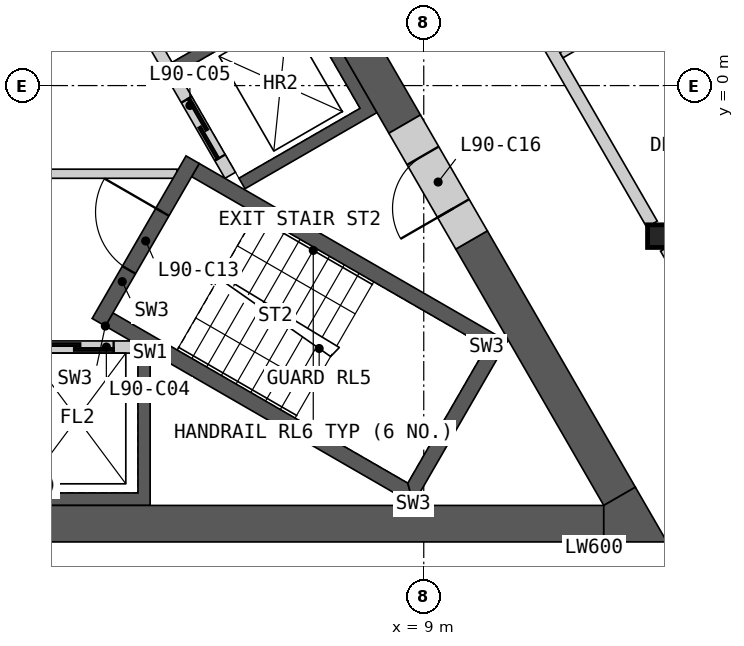
"""IFC4 building model, lengths in metres.
Left out: names, types, materials, properties, quantities, classifications, styles, units other than length and angle.
Written with IfcOpenShell. Run it as: python <this file> out.ifc"""

import sys

from ifc_helpers import new_model, si_unit, direction, frame, frame_2d, origin, origin_2d, place, context, subcontext, project, spatial, polyline, rectangle, i_section, outline, extrude, element, fill, save


model = new_model("IFC4")
c1 = context("Model", 3, precision=1e-05, world=origin(), true_north=direction((0.0, 1.0)))
c2 = subcontext(c1, "Body", "Model", "MODEL_VIEW")
j1 = project(units=[si_unit("LENGTHUNIT", "METRE"), si_unit("PLANEANGLEUNIT", "RADIAN")], contexts=[c1])
p1 = place(None, origin())
s1 = spatial("IfcSite", under=j1, at=p1, CompositionType="ELEMENT")
p2 = place(p1, origin())
s2 = spatial("IfcBuilding", under=s1, at=p2, CompositionType="ELEMENT")
p3 = place(p2, frame((0.0, 0.0, 395.0)))
s3 = spatial("IfcBuildingStorey", under=s2, at=p3, CompositionType="ELEMENT", Elevation=395.0)
p4 = place(p3, frame((12.868, -2.476, 0.0), z_axis=(0.0, 0.0, 1.0), x_axis=(1.0, 0.0, 0.0)))
e1 = element("IfcColumn", 1, at=p4, inside=s3, PredefinedType="COLUMN", context=c2, shape_type="SweptSolid", body=[
    extrude(i_section(OverallWidth=0.374, OverallDepth=0.372, WebThickness=0.016, FlangeThickness=0.026, at=origin_2d()), origin(), (0.0, 0.0, 1.0), 3.4),
])
p5 = place(p3, origin())
e2 = element("IfcWall", 2, at=p5, inside=s3, PredefinedType="SHEAR", context=c2, shape_type="SweptSolid", body=[
    extrude(outline(polyline([(4.5, -4.4), (4.5, -6.906), (-4.5, -6.906), (-4.5, -4.4), (-4.3, -4.4), (-4.3, -6.7), (-2.3, -6.7), (-2.3, -4.4), (-2.1, -4.4), (-2.1, -6.7), (-0.1, -6.7), (-0.1, -4.4), (0.1, -4.4), (0.1, -6.7), (2.1, -6.7), (2.1, -4.4), (2.3, -4.4), (2.3, -6.7), (4.3, -6.7), (4.3, -4.4), (4.5, -4.4)])), origin(), (0.0, 0.0, 1.0), 3.1),
])
p6 = place(p3, frame((-4.187, -4.3, 0.0), z_axis=(0.0, 0.0, 1.0), x_axis=(1.0, 0.0, 0.0)))
e3 = element("IfcWall", 3, at=p6, inside=s3, PredefinedType="SOLIDWALL", context=c2, shape_type="SweptSolid", body=[
    extrude(rectangle(XDim=8.373, YDim=0.2, at=frame_2d((4.187, 0.0))), origin(), (0.0, 0.0, 1.0), 3.1),
])
p7 = place(p6, frame((0.287, 0.0, 0.0)))
e4 = element("IfcOpeningElement", 4, at=p7, cuts=e3, PredefinedType="OPENING", context=c2, shape_type="SweptSolid", body=[
    extrude(rectangle(XDim=1.2, YDim=2.1, at=frame_2d((0.6, 1.05))), frame((0.0, 0.11, 0.0), z_axis=(0.0, -1.0, 0.0), x_axis=(1.0, 0.0, 0.0)), (0.0, 0.0, 1.0), 0.22),
])
p8 = place(p6, frame((2.387, 0.0, 0.0)))
e5 = element("IfcOpeningElement", 5, at=p8, cuts=e3, PredefinedType="OPENING", context=c2, shape_type="SweptSolid", body=[
    extrude(rectangle(XDim=1.4, YDim=2.1, at=frame_2d((0.7, 1.05))), frame((0.0, 0.11, 0.0), z_axis=(0.0, -1.0, 0.0), x_axis=(1.0, 0.0, 0.0)), (0.0, 0.0, 1.0), 0.22),
])
p9 = place(p6, frame((4.737, 0.0, 0.0)))
e6 = element("IfcOpeningElement", 6, at=p9, cuts=e3, PredefinedType="OPENING", context=c2, shape_type="SweptSolid", body=[
    extrude(rectangle(XDim=1.1, YDim=2.1, at=frame_2d((0.55, 1.05))), frame((0.0, 0.11, 0.0), z_axis=(0.0, -1.0, 0.0), x_axis=(1.0, 0.0, 0.0)), (0.0, 0.0, 1.0), 0.22),
])
p10 = place(p6, frame((6.887, 0.0, 0.0)))
e7 = element("IfcOpeningElement", 7, at=p10, cuts=e3, PredefinedType="OPENING", context=c2, shape_type="SweptSolid", body=[
    extrude(rectangle(XDim=1.2, YDim=2.1, at=frame_2d((0.6, 1.05))), frame((0.0, 0.11, 0.0), z_axis=(0.0, -1.0, 0.0), x_axis=(1.0, 0.0, 0.0)), (0.0, 0.0, 1.0), 0.22),
])
p11 = place(p3, origin())
e8 = element("IfcWall", 8, at=p11, inside=s3, PredefinedType="SHEAR", context=c2, shape_type="SweptSolid", body=[
    extrude(outline(polyline([(1.561, 6.097), (3.731, 7.35), (8.231, -0.444), (6.061, -1.697), (5.96, -1.524), (7.952, -0.374), (6.952, 1.358), (4.96, 0.208), (4.861, 0.381), (6.852, 1.531), (5.852, 3.263), (3.861, 2.113), (3.76, 2.287), (5.752, 3.437), (4.752, 5.169), (2.76, 4.019), (2.66, 4.192), (4.652, 5.342), (3.652, 7.074), (1.66, 5.924), (1.561, 6.097)])), origin(), (0.0, 0.0, 1.0), 3.1),
])
p12 = place(p3, frame((5.817, -1.476, 0.0), z_axis=(0.0, 0.0, 1.0), x_axis=(-0.500002616675, 0.866023893041, 0.0)))
e9 = element("IfcWall", 9, at=p12, inside=s3, PredefinedType="SOLIDWALL", context=c2, shape_type="SweptSolid", body=[
    extrude(rectangle(XDim=8.373, YDim=0.2, at=frame_2d((4.187, 0.0))), origin(), (0.0, 0.0, 1.0), 3.1),
])
p13 = place(p12, frame((0.337, 0.0, 0.0)))
e10 = element("IfcOpeningElement", 10, at=p13, cuts=e9, PredefinedType="OPENING", context=c2, shape_type="SweptSolid", body=[
    extrude(rectangle(XDim=1.1, YDim=2.1, at=frame_2d((0.55, 1.05))), frame((0.0, 0.11, 0.0), z_axis=(0.0, -1.0, 0.0), x_axis=(1.0, 0.0, 0.0)), (0.0, 0.0, 1.0), 0.22),
])
p14 = place(p12, frame((2.537, 0.0, 0.0)))
e11 = element("IfcOpeningElement", 11, at=p14, cuts=e9, PredefinedType="OPENING", context=c2, shape_type="SweptSolid", body=[
    extrude(rectangle(XDim=1.1, YDim=2.1, at=frame_2d((0.55, 1.05))), frame((0.0, 0.11, 0.0), z_axis=(0.0, -1.0, 0.0), x_axis=(1.0, 0.0, 0.0)), (0.0, 0.0, 1.0), 0.22),
])
p15 = place(p12, frame((4.737, 0.0, 0.0)))
e12 = element("IfcOpeningElement", 12, at=p15, cuts=e9, PredefinedType="OPENING", context=c2, shape_type="SweptSolid", body=[
    extrude(rectangle(XDim=1.1, YDim=2.1, at=frame_2d((0.55, 1.05))), frame((0.0, 0.11, 0.0), z_axis=(0.0, -1.0, 0.0), x_axis=(1.0, 0.0, 0.0)), (0.0, 0.0, 1.0), 0.22),
])
p16 = place(p12, frame((7.037, 0.0, 0.0)))
e13 = element("IfcOpeningElement", 13, at=p16, cuts=e9, PredefinedType="OPENING", context=c2, shape_type="SweptSolid", body=[
    extrude(rectangle(XDim=0.9, YDim=2.1, at=frame_2d((0.45, 1.05))), frame((0.0, 0.11, 0.0), z_axis=(0.0, -1.0, 0.0), x_axis=(1.0, 0.0, 0.0)), (0.0, 0.0, 1.0), 0.22),
])
p17 = place(p3, frame((-4.941, -1.45, 0.0), z_axis=(0.0, 0.0, 1.0), x_axis=(1.0, 0.0, 0.0)))
e14 = element("IfcWall", 14, at=p17, inside=s3, PredefinedType="PARTITIONING", context=c2, shape_type="SweptSolid", body=[
    extrude(rectangle(XDim=9.882, YDim=0.15, at=frame_2d((4.941, 0.0))), origin(), (0.0, 0.0, 1.0), 3.1),
])
p18 = place(p17, frame((4.391, 0.0, 0.0)))
e15 = element("IfcOpeningElement", 15, at=p18, cuts=e14, PredefinedType="OPENING", context=c2, shape_type="SweptSolid", body=[
    extrude(rectangle(XDim=1.1, YDim=2.1, at=frame_2d((0.55, 1.05))), frame((0.0, 0.085, 0.0), z_axis=(0.0, -1.0, 0.0), x_axis=(1.0, 0.0, 0.0)), (0.0, 0.0, 1.0), 0.17),
])
p19 = place(p3, origin())
e16 = element("IfcWall", 16, at=p19, inside=s3, PredefinedType="SHEAR", context=c2, shape_type="SweptSolid", body=[
    extrude(outline(polyline([(3.763, -3.956), (8.83, -6.881), (8.738, -6.539), (3.888, -3.739), (3.763, -3.956)])), origin(), (0.0, 0.0, 1.0), 3.1),
])
p20 = place(p3, origin())
e17 = element("IfcWall", 17, at=p20, inside=s3, PredefinedType="SHEAR", context=c2, shape_type="SweptSolid", body=[
    extrude(outline(polyline([(8.83, -6.881), (10.374, -4.206), (10.032, -4.298), (8.738, -6.539), (8.83, -6.881)])), origin(), (0.0, 0.0, 1.0), 3.1),
])
p21 = place(p3, origin())
e18 = element("IfcWall", 18, at=p21, inside=s3, PredefinedType="SHEAR", context=c2, shape_type="SweptSolid", body=[
    extrude(outline(polyline([(10.032, -4.298), (10.374, -4.206), (5.307, -1.281), (5.182, -1.498), (10.032, -4.298)])), origin(), (0.0, 0.0, 1.0), 3.1),
])
p22 = place(p3, frame((3.655, -3.893, 0.0), z_axis=(0.0, 0.0, 1.0), x_axis=(0.499982516597, 0.866035497597, 0.0)))
e19 = element("IfcWall", 19, at=p22, inside=s3, PredefinedType="SHEAR", context=c2, shape_type="SweptSolid", body=[
    extrude(rectangle(XDim=3.088, YDim=0.25, at=frame_2d((1.544, 0.0))), origin(), (0.0, 0.0, 1.0), 3.1),
])
p23 = place(p22, frame((0.994, 0.0, 0.0)))
e20 = element("IfcOpeningElement", 20, at=p23, cuts=e19, PredefinedType="OPENING", context=c2, shape_type="SweptSolid", body=[
    extrude(rectangle(XDim=1.1, YDim=2.1, at=frame_2d((0.55, 1.05))), frame((0.0, 0.135, 0.0), z_axis=(0.0, -1.0, 0.0), x_axis=(1.0, 0.0, 0.0)), (0.0, 0.0, 1.0), 0.27),
])
p24 = place(p3, frame((-11.961, -7.206, 0.0), z_axis=(0.0, 0.0, 1.0), x_axis=(1.0, 0.0, 0.0)))
e21 = element("IfcWall", 21, at=p24, inside=s3, PredefinedType="SHEAR", context=c2, shape_type="SweptSolid", body=[
    extrude(rectangle(XDim=23.921, YDim=0.6, at=frame_2d((11.961, 0.0))), origin(), (0.0, 0.0, 1.0), 3.1),
])
p25 = place(p3, frame((8.686, -0.634, 0.0), z_axis=(0.0, 0.0, 1.0), x_axis=(-0.50001836461, 0.866014800712, 0.0)))
e22 = element("IfcWall", 22, at=p25, inside=s3, PredefinedType="SHEAR", context=c2, shape_type="SweptSolid", body=[
    extrude(rectangle(XDim=10.451, YDim=0.6, at=frame_2d((5.225, 0.0))), origin(), (0.0, 0.0, 1.0), 3.1),
])
p26 = place(p3, frame((12.221, -6.756, 0.0), z_axis=(0.0, 0.0, 1.0), x_axis=(-0.50000604952, 0.866021911064, 0.0)))
e23 = element("IfcWall", 23, at=p26, inside=s3, PredefinedType="SHEAR", context=c2, shape_type="SweptSolid", body=[
    extrude(rectangle(XDim=4.869, YDim=0.6, at=frame_2d((2.434, 0.0))), origin(), (0.0, 0.0, 1.0), 3.1),
])
p27 = place(p3, origin())
e24 = element("IfcWall", 24, at=p27, inside=s3, PredefinedType="SHEAR", context=c2, shape_type="SweptSolid", body=[
    extrude(outline(polyline([(11.961, -7.506), (11.961, -6.906), (12.48, -6.606), (13.0, -7.506), (11.961, -7.506)])), origin(), (0.0, 0.0, 1.0), 3.1),
])
p28 = place(p3, frame((9.786, -2.539, 0.0), z_axis=(0.0, 0.0, 1.0), x_axis=(-0.499981787252, 0.866035918664, 0.0)))
e25 = element("IfcWall", 25, at=p28, inside=s3, PredefinedType="SHEAR", context=c2, shape_type="SweptSolid", body=[
    extrude(rectangle(XDim=2.2, YDim=0.6, at=frame_2d((1.1, 0.0))), origin(), (0.0, 0.0, 1.0), 3.1),
])
p29 = place(p28, frame((0.6, 0.0, 0.0)))
e26 = element("IfcOpeningElement", 26, at=p29, cuts=e25, PredefinedType="OPENING", context=c2, shape_type="SweptSolid", body=[
    extrude(rectangle(XDim=1.0, YDim=2.1, at=frame_2d((0.5, 1.05))), frame((0.0, 0.31, 0.0), z_axis=(0.0, -1.0, 0.0), x_axis=(1.0, 0.0, 0.0)), (0.0, 0.0, 1.0), 0.62),
])
p30 = place(p3, frame((8.692, 4.756, 0.0), z_axis=(0.0, 0.0, 1.0), x_axis=(0.500001682468, -0.866024432409, 0.0)))
e27 = element("IfcWall", 27, at=p30, inside=s3, PredefinedType="PARTITIONING", context=c2, shape_type="SweptSolid", body=[
    extrude(rectangle(XDim=8.124, YDim=0.2, at=frame_2d((4.062, 0.0))), origin(), (0.0, 0.0, 1.0), 3.1),
])
p31 = place(p30, frame((1.956, 0.0, 0.0)))
e28 = element("IfcOpeningElement", 28, at=p31, cuts=e27, PredefinedType="OPENING", context=c2, shape_type="SweptSolid", body=[
    extrude(rectangle(XDim=1.0, YDim=2.1, at=frame_2d((0.5, 1.05))), frame((0.0, 0.11, 0.0), z_axis=(0.0, -1.0, 0.0), x_axis=(1.0, 0.0, 0.0)), (0.0, 0.0, 1.0), 0.22),
])
p32 = place(p3, frame((12.981, -2.673, 0.0), z_axis=(0.0, 0.0, 1.0), x_axis=(0.499974648164, -0.866040040179, 0.0)))
e29 = element("IfcWall", 29, at=p32, inside=s3, PredefinedType="PARTITIONING", context=c2, shape_type="SweptSolid", body=[
    extrude(rectangle(XDim=4.525, YDim=0.2, at=frame_2d((2.263, 0.0))), origin(), (0.0, 0.0, 1.0), 3.1),
])
p33 = place(p3, frame((11.265, 0.5, 0.0), z_axis=(0.0, 0.0, 1.0), x_axis=(0.866033839264, 0.499985389037, 0.0)))
e30 = element("IfcWall", 30, at=p33, inside=s3, PredefinedType="PARTITIONING", context=c2, shape_type="SweptSolid", body=[
    extrude(rectangle(XDim=7.1, YDim=0.1, at=frame_2d((3.55, 0.0))), origin(), (0.0, 0.0, 1.0), 2.33),
])
p34 = place(p33, frame((4.488, 0.0, 0.0)))
e31 = element("IfcOpeningElement", 31, at=p34, cuts=e30, PredefinedType="OPENING", context=c2, shape_type="SweptSolid", body=[
    extrude(rectangle(XDim=0.95, YDim=2.1, at=frame_2d((0.475, 1.05))), frame((0.0, 0.06, 0.0), z_axis=(0.0, -1.0, 0.0), x_axis=(1.0, 0.0, 0.0)), (0.0, 0.0, 1.0), 0.12),
])
p35 = place(p10, origin())
e32 = element("IfcDoor", 32, at=p35, inside=s3, OperationType="SLIDING_TO_LEFT", PredefinedType="DOOR", context=c2, shape_type="SweptSolid", body=[
    extrude(rectangle(XDim=1.2, YDim=2.1, at=frame_2d((0.6, 1.05))), frame((0.0, 0.025, 0.0), z_axis=(0.0, -1.0, 0.0), x_axis=(1.0, 0.0, 0.0)), (0.0, 0.0, 1.0), 0.05),
])
fill(e7, e32)
p36 = place(p13, origin())
e33 = element("IfcDoor", 33, at=p36, inside=s3, OperationType="SLIDING_TO_LEFT", PredefinedType="DOOR", context=c2, shape_type="SweptSolid", body=[
    extrude(rectangle(XDim=1.1, YDim=2.1, at=frame_2d((0.55, 1.05))), frame((0.0, 0.025, 0.0), z_axis=(0.0, -1.0, 0.0), x_axis=(1.0, 0.0, 0.0)), (0.0, 0.0, 1.0), 0.05),
])
fill(e10, e33)
p37 = place(p23, origin())
e34 = element("IfcDoor", 34, at=p37, inside=s3, OperationType="SINGLE_SWING_RIGHT", PredefinedType="DOOR", context=c2, shape_type="SweptSolid", body=[
    extrude(rectangle(XDim=1.1, YDim=2.1, at=frame_2d((0.55, 1.05))), frame((0.0, 0.025, 0.0), z_axis=(0.0, -1.0, 0.0), x_axis=(1.0, 0.0, 0.0)), (0.0, 0.0, 1.0), 0.05),
])
fill(e20, e34)
p38 = place(p29, origin())
e35 = element("IfcDoor", 35, at=p38, inside=s3, OperationType="SINGLE_SWING_LEFT", PredefinedType="DOOR", context=c2, shape_type="SweptSolid", body=[
    extrude(rectangle(XDim=1.0, YDim=2.1, at=frame_2d((0.5, 1.05))), frame((0.0, 0.055, 0.0), z_axis=(0.0, -1.0, 0.0), x_axis=(1.0, 0.0, 0.0)), (0.0, 0.0, 1.0), 0.05),
])
fill(e26, e35)
save(model, sys.argv[1])
